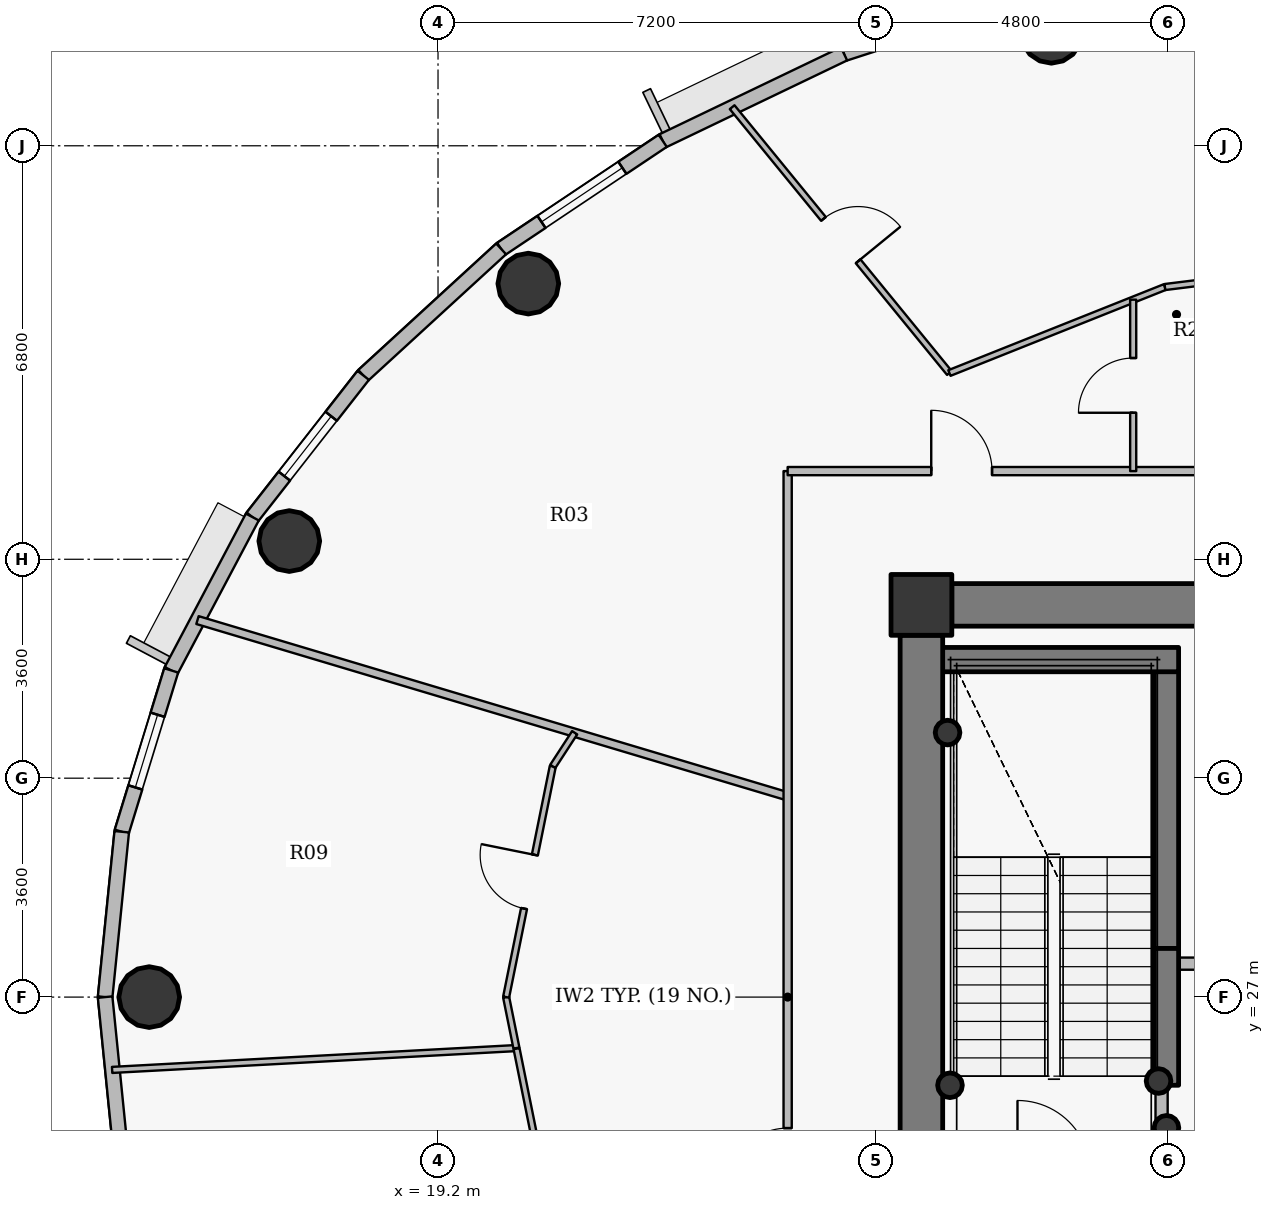
"""IFC4 building model, lengths in metres.
Left out: names, types, materials, properties, quantities, classifications, styles, units other than length and angle.
Written with IfcOpenShell. Run it as: python <this file> out.ifc"""

import sys

from ifc_helpers import new_model, si_unit, direction, frame, frame_2d, origin, origin_2d, place, context, subcontext, project, spatial, rectangle, hollow_circle, extrude, source, transform, mapped, element, fill, save


model = new_model("IFC4")
c1 = context("Model", 3, precision=1e-05, world=origin(), true_north=direction((0.0, 1.0)))
c2 = subcontext(c1, "Body", "Model", "MODEL_VIEW")
j1 = project(units=[si_unit("LENGTHUNIT", "METRE"), si_unit("PLANEANGLEUNIT", "RADIAN")], contexts=[c1])
p1 = place(None, origin())
s1 = spatial("IfcSite", under=j1, at=p1, CompositionType="ELEMENT")
p2 = place(p1, origin())
s2 = spatial("IfcBuilding", under=s1, at=p2, CompositionType="ELEMENT")
p3 = place(p2, frame((0.0, 0.0, 280.5)))
s3 = spatial("IfcBuildingStorey", under=s2, at=p3, CompositionType="ELEMENT", Elevation=280.5)
p4 = place(p3, frame((27.15, 33.45, 0.0), z_axis=(0.0, 0.0, 1.0), x_axis=(1.0, 0.0, 0.0)))
e1 = element("IfcColumn", 1, at=p4, inside=s3, PredefinedType="COLUMN", context=c2, shape_type="SweptSolid", body=[
    extrude(rectangle(XDim=1.0, YDim=1.0, at=origin_2d()), origin(), (0.0, 0.0, 1.0), 3.75),
])
p5 = place(p3, frame((31.18, 27.8, 0.0), z_axis=(0.0, 0.0, 1.0), x_axis=(0.0, 1.0, 0.0)))
e2 = element("IfcWall", 2, at=p5, inside=s3, PredefinedType="SHEAR", context=c2, shape_type="SweptSolid", body=[
    extrude(rectangle(XDim=4.75, YDim=0.4, at=frame_2d((2.375, 0.0))), origin(), (0.0, 0.0, 1.0), 3.75),
])
p6 = place(p3, frame((27.25, 32.55, 0.0), z_axis=(0.0, 0.0, 1.0), x_axis=(1.0, 0.0, 0.0)))
e3 = element("IfcWall", 3, at=p6, inside=s3, PredefinedType="SHEAR", context=c2, shape_type="SweptSolid", body=[
    extrude(rectangle(XDim=4.13, YDim=0.4, at=frame_2d((2.065, 0.0))), origin(), (0.0, 0.0, 1.0), 3.75),
])
for number, where, z_axis, x_axis in (
    (4, (27.58, 31.35, 0.0), (0.0, 0.0, 1.0), (1.0, 0.0, 0.0)),
    (5, (31.05, 25.62, 0.0), (0.0, 0.0, 1.0), (1.0, 0.0, 0.0)),
    (6, (31.18, 24.85, 0.0), (0.0, 0.0, 1.0), (1.0, 0.0, 0.0)),
    (7, (27.62, 25.55, 0.0), (0.0, 0.0, 1.0), (1.0, 0.0, 0.0)),
):
    element("IfcColumn", number, at=place(p3, frame(where, z_axis=z_axis, x_axis=x_axis)), inside=s3, PredefinedType="COLUMN", context=c2, shape_type="SweptSolid", body=[
        extrude(hollow_circle(Radius=0.203, WallThickness=0.016, at=origin_2d()), origin(), (0.0, 0.0, 1.0), 3.75),
    ])
p7 = place(p3, frame((27.65, 33.45, 0.0), z_axis=(0.0, 0.0, 1.0), x_axis=(1.0, 0.0, 0.0)))
e8 = element("IfcWall", 8, at=p7, inside=s3, PredefinedType="SHEAR", context=c2, shape_type="SweptSolid", body=[
    extrude(rectangle(XDim=16.7, YDim=0.7, at=frame_2d((8.35, 0.0))), origin(), (0.0, 0.0, 1.0), 3.05),
])
p8 = place(p7, frame((12.775, 0.0, 0.0)))
e9 = element("IfcOpeningElement", 9, at=p8, cuts=e8, PredefinedType="OPENING", context=c2, shape_type="SweptSolid", body=[
    extrude(rectangle(XDim=1.15, YDim=2.15, at=origin_2d()), frame((0.575, 0.36, 1.075), z_axis=(0.0, -1.0, 0.0), x_axis=(1.0, 0.0, 0.0)), (0.0, 0.0, 1.0), 0.72),
])
p9 = place(p3, frame((27.15, 21.05, 0.0), z_axis=(0.0, 0.0, 1.0), x_axis=(0.0, 1.0, 0.0)))
e10 = element("IfcWall", 10, at=p9, inside=s3, PredefinedType="SHEAR", context=c2, shape_type="SweptSolid", body=[
    extrude(rectangle(XDim=11.9, YDim=0.7, at=frame_2d((5.95, 0.0))), origin(), (0.0, 0.0, 1.0), 3.05),
])
p10 = place(p3, frame((31.18, 25.55, 0.0), z_axis=(0.0, 0.0, 1.0), x_axis=(0.0, 1.0, 0.0)))
e11 = element("IfcWall", 11, at=p10, inside=s3, PredefinedType="SHEAR", context=c2, shape_type="SweptSolid", body=[
    extrude(rectangle(XDim=2.25, YDim=0.4, at=frame_2d((1.125, 0.0))), origin(), (0.0, 0.0, 1.0), 3.1),
])
for number, where, z_axis, x_axis in (
    (12, (29.288, 42.858, 0.0), (0.0, 0.0, 1.0), (1.0, 0.0, 0.0)),
    (13, (20.685, 38.733, 0.0), (0.0, 0.0, 1.0), (1.0, 0.0, 0.0)),
    (14, (16.754, 34.5, 0.0), (0.0, 0.0, 1.0), (1.0, 0.0, 0.0)),
    (15, (14.45, 27.0, 0.0), (0.0, 0.0, 1.0), (1.0, 0.0, 0.0)),
):
    element("IfcColumn", number, at=place(p3, frame(where, z_axis=z_axis, x_axis=x_axis)), inside=s3, PredefinedType="COLUMN", context=c2, shape_type="SweptSolid", body=[
        extrude(hollow_circle(Radius=0.5, WallThickness=0.032, at=origin_2d()), origin(), (0.0, 0.0, 1.0), 3.75),
    ])
p11 = place(p3, frame((25.877, 42.512, 0.0), z_axis=(0.0, 0.0, 1.0), x_axis=(0.95123136723, 0.308478339592, 0.0)))
e16 = element("IfcWall", 16, at=p11, inside=s3, PredefinedType="SOLIDWALL", context=c2, shape_type="SweptSolid", body=[
    extrude(rectangle(XDim=3.398, YDim=0.24, at=frame_2d((1.699, 0.0))), origin(), (0.0, 0.0, 1.0), 3.5),
])
p12 = place(p11, frame((0.899, 0.0, 0.9)))
e17 = element("IfcOpeningElement", 17, at=p12, cuts=e16, PredefinedType="OPENING", context=c2, shape_type="SweptSolid", body=[
    extrude(rectangle(XDim=1.6, YDim=1.75, at=origin_2d()), frame((0.8, 0.13, 0.875), z_axis=(0.0, -1.0, 0.0), x_axis=(1.0, 0.0, 0.0)), (0.0, 0.0, 1.0), 0.26),
])
p13 = place(p3, frame((22.896, 41.082, 0.0), z_axis=(0.0, 0.0, 1.0), x_axis=(0.901573741254, 0.43262546051, 0.0)))
e18 = element("IfcWall", 18, at=p13, inside=s3, PredefinedType="SOLIDWALL", context=c2, shape_type="SweptSolid", body=[
    extrude(rectangle(XDim=3.307, YDim=0.24, at=frame_2d((1.653, 0.0))), origin(), (0.0, 0.0, 1.0), 3.5),
])
p14 = place(p3, frame((20.238, 39.304, 0.0), z_axis=(0.0, 0.0, 1.0), x_axis=(0.831250592635, 0.55589787933, 0.0)))
e19 = element("IfcWall", 19, at=p14, inside=s3, PredefinedType="SOLIDWALL", context=c2, shape_type="SweptSolid", body=[
    extrude(rectangle(XDim=3.197, YDim=0.24, at=frame_2d((1.599, 0.0))), origin(), (0.0, 0.0, 1.0), 3.5),
])
p15 = place(p14, frame((0.799, 0.0, 0.9)))
e20 = element("IfcOpeningElement", 20, at=p15, cuts=e19, PredefinedType="OPENING", context=c2, shape_type="SweptSolid", body=[
    extrude(rectangle(XDim=1.6, YDim=1.75, at=origin_2d()), frame((0.8, 0.13, 0.875), z_axis=(0.0, -1.0, 0.0), x_axis=(1.0, 0.0, 0.0)), (0.0, 0.0, 1.0), 0.26),
])
p16 = place(p3, frame((17.97, 37.225, 0.0), z_axis=(0.0, 0.0, 1.0), x_axis=(0.737068506972, 0.675818034703, 0.0)))
e21 = element("IfcWall", 21, at=p16, inside=s3, PredefinedType="SOLIDWALL", context=c2, shape_type="SweptSolid", body=[
    extrude(rectangle(XDim=3.077, YDim=0.24, at=frame_2d((1.539, 0.0))), origin(), (0.0, 0.0, 1.0), 3.5),
])
p17 = place(p3, frame((16.146, 34.895, 0.0), z_axis=(0.0, 0.0, 1.0), x_axis=(0.616337186556, 0.787482363275, 0.0)))
e22 = element("IfcWall", 22, at=p17, inside=s3, PredefinedType="SOLIDWALL", context=c2, shape_type="SweptSolid", body=[
    extrude(rectangle(XDim=2.958, YDim=0.24, at=frame_2d((1.479, 0.0))), origin(), (0.0, 0.0, 1.0), 3.5),
])
p18 = place(p17, frame((0.854, 0.0, 0.9)))
e23 = element("IfcOpeningElement", 23, at=p18, cuts=e22, PredefinedType="OPENING", context=c2, shape_type="SweptSolid", body=[
    extrude(rectangle(XDim=1.25, YDim=1.65, at=origin_2d()), frame((0.625, 0.13, 0.825), z_axis=(0.0, -1.0, 0.0), x_axis=(1.0, 0.0, 0.0)), (0.0, 0.0, 1.0), 0.26),
])
p19 = place(p3, frame((14.812, 32.372, 0.0), z_axis=(0.0, 0.0, 1.0), x_axis=(0.467628269026, 0.883925224218, 0.0)))
e24 = element("IfcWall", 24, at=p19, inside=s3, PredefinedType="SOLIDWALL", context=c2, shape_type="SweptSolid", body=[
    extrude(rectangle(XDim=2.854, YDim=0.24, at=frame_2d((1.427, 0.0))), origin(), (0.0, 0.0, 1.0), 3.5),
])
p20 = place(p3, frame((13.998, 29.719, 0.0), z_axis=(0.0, 0.0, 1.0), x_axis=(0.2931213403, 0.956075248012, 0.0)))
e25 = element("IfcWall", 25, at=p20, inside=s3, PredefinedType="SOLIDWALL", context=c2, shape_type="SweptSolid", body=[
    extrude(rectangle(XDim=2.775, YDim=0.24, at=frame_2d((1.388, 0.0))), origin(), (0.0, 0.0, 1.0), 3.5),
])
p21 = place(p20, frame((0.763, 0.0, 0.9)))
e26 = element("IfcOpeningElement", 26, at=p21, cuts=e25, PredefinedType="OPENING", context=c2, shape_type="SweptSolid", body=[
    extrude(rectangle(XDim=1.25, YDim=1.65, at=origin_2d()), frame((0.625, 0.13, 0.825), z_axis=(0.0, -1.0, 0.0), x_axis=(1.0, 0.0, 0.0)), (0.0, 0.0, 1.0), 0.26),
])
for number, where, z_axis, x_axis in (
    (27, (13.725, 27.0, 0.0), (0.0, 0.0, 1.0), (0.1, 0.995, 0.0)),
    (28, (13.998, 24.281, 0.0), (0.0, 0.0, 1.0), (-0.1, 0.995, 0.0)),
):
    element("IfcWall", number, at=place(p3, frame(where, z_axis=z_axis, x_axis=x_axis)), inside=s3, PredefinedType="SOLIDWALL", context=c2, shape_type="SweptSolid", body=[
        extrude(rectangle(XDim=2.733, YDim=0.24, at=frame_2d((1.366, 0.0))), origin(), (0.0, 0.0, 1.0), 3.5),
    ])
p22 = place(p3, frame((13.84, 25.802, 0.0), z_axis=(0.0, 0.0, 1.0), x_axis=(0.998542593702, 0.05396932983, 0.0)))
e29 = element("IfcWall", 29, at=p22, inside=s3, PredefinedType="PARTITIONING", context=c2, shape_type="SweptSolid", body=[
    extrude(rectangle(XDim=6.659, YDim=0.1, at=frame_2d((3.33, 0.0))), origin(), (0.0, 0.0, 1.0), 2.985),
])
p23 = place(p3, frame((15.244, 33.2, 0.0), z_axis=(0.0, 0.0, 1.0), x_axis=(0.958167234785, -0.286208927508, 0.0)))
e30 = element("IfcWall", 30, at=p23, inside=s3, PredefinedType="PARTITIONING", context=c2, shape_type="SweptSolid", body=[
    extrude(rectangle(XDim=10.13, YDim=0.135, at=frame_2d((5.065, 0.0))), origin(), (0.0, 0.0, 1.0), 2.985),
])
p24 = place(p3, frame((20.32, 27.0, 0.0), z_axis=(0.0, 0.0, 1.0), x_axis=(0.198147261764, -0.980172261725, 0.0)))
e31 = element("IfcWall", 31, at=p24, inside=s3, PredefinedType="PARTITIONING", context=c2, shape_type="SweptSolid", body=[
    extrude(rectangle(XDim=0.855, YDim=0.1, at=frame_2d((0.427, 0.0))), origin(), (0.0, 0.0, 1.0), 3.035),
])
p25 = place(p3, frame((20.32, 27.0, 0.0), z_axis=(0.0, 0.0, 1.0), x_axis=(0.198226068862, 0.980156327135, 0.0)))
e32 = element("IfcWall", 32, at=p25, inside=s3, PredefinedType="PARTITIONING", context=c2, shape_type="SweptSolid", body=[
    extrude(rectangle(XDim=3.871, YDim=0.1, at=frame_2d((1.936, 0.0))), origin(), (0.0, 0.0, 1.0), 3.035),
])
p26 = place(p25, frame((1.486, 0.0, 0.0)))
e33 = element("IfcOpeningElement", 33, at=p26, cuts=e32, PredefinedType="OPENING", context=c2, shape_type="SweptSolid", body=[
    extrude(rectangle(XDim=0.9, YDim=2.1, at=origin_2d()), frame((0.45, 0.06, 1.05), z_axis=(0.0, -1.0, 0.0), x_axis=(1.0, 0.0, 0.0)), (0.0, 0.0, 1.0), 0.12),
])
p27 = place(p3, frame((20.491, 26.152, 0.0), z_axis=(0.0, 0.0, 1.0), x_axis=(0.198255475343, -0.980150379532, 0.0)))
e34 = element("IfcWall", 34, at=p27, inside=s3, PredefinedType="PARTITIONING", context=c2, shape_type="SweptSolid", body=[
    extrude(rectangle(XDim=3.006, YDim=0.1, at=frame_2d((1.503, 0.0))), origin(), (0.0, 0.0, 1.0), 3.035),
])
p28 = place(p3, frame((21.087, 30.794, 0.0), z_axis=(0.0, 0.0, 1.0), x_axis=(0.545443507803, 0.838147588313, 0.0)))
e35 = element("IfcWall", 35, at=p28, inside=s3, PredefinedType="PARTITIONING", context=c2, shape_type="SweptSolid", body=[
    extrude(rectangle(XDim=0.66, YDim=0.1, at=frame_2d((0.33, 0.0))), origin(), (0.0, 0.0, 1.0), 3.5),
])
p29 = place(p3, frame((24.037, 41.635, 0.0), z_axis=(0.0, 0.0, 1.0), x_axis=(0.632896331295, -0.774236549017, 0.0)))
e36 = element("IfcWall", 36, at=p29, inside=s3, PredefinedType="PARTITIONING", context=c2, shape_type="SweptSolid", body=[
    extrude(rectangle(XDim=5.647, YDim=0.1, at=frame_2d((2.823, 0.0))), origin(), (0.0, 0.0, 1.0), 2.985),
])
p30 = place(p29, frame((2.373, 0.0, 0.0)))
e37 = element("IfcOpeningElement", 37, at=p30, cuts=e36, PredefinedType="OPENING", context=c2, shape_type="SweptSolid", body=[
    extrude(rectangle(XDim=0.9, YDim=2.1, at=origin_2d()), frame((0.45, 0.06, 1.05), z_axis=(0.0, -1.0, 0.0), x_axis=(1.0, 0.0, 0.0)), (0.0, 0.0, 1.0), 0.12),
])
p31 = place(p3, frame((24.95, 18.35, 0.0), z_axis=(0.0, 0.0, 1.0), x_axis=(0.0, 1.0, 0.0)))
e38 = element("IfcWall", 38, at=p31, inside=s3, PredefinedType="PARTITIONING", context=c2, shape_type="SweptSolid", body=[
    extrude(rectangle(XDim=17.3, YDim=0.135, at=frame_2d((8.65, 0.0))), origin(), (0.0, 0.0, 1.0), 3.035),
])
p32 = place(p31, frame((5.495, 0.0, 0.0)))
e39 = element("IfcOpeningElement", 39, at=p32, cuts=e38, PredefinedType="OPENING", context=c2, shape_type="SweptSolid", body=[
    extrude(rectangle(XDim=1.0, YDim=2.15, at=origin_2d()), frame((0.5, 0.078, 1.075), z_axis=(0.0, -1.0, 0.0), x_axis=(1.0, 0.0, 0.0)), (0.0, 0.0, 1.0), 0.155),
])
p33 = place(p3, frame((24.95, 35.65, 0.0), z_axis=(0.0, 0.0, 1.0), x_axis=(1.0, 0.0, 0.0)))
e40 = element("IfcWall", 40, at=p33, inside=s3, PredefinedType="PARTITIONING", context=c2, shape_type="SweptSolid", body=[
    extrude(rectangle(XDim=10.1, YDim=0.135, at=frame_2d((5.05, 0.0))), origin(), (0.0, 0.0, 1.0), 3.035),
])
p34 = place(p33, frame((2.362, 0.0, 0.0)))
e41 = element("IfcOpeningElement", 41, at=p34, cuts=e40, PredefinedType="OPENING", context=c2, shape_type="SweptSolid", body=[
    extrude(rectangle(XDim=1.0, YDim=2.15, at=origin_2d()), frame((0.5, 0.078, 1.075), z_axis=(0.0, -1.0, 0.0), x_axis=(1.0, 0.0, 0.0)), (0.0, 0.0, 1.0), 0.155),
])
p35 = place(p3, frame((27.611, 37.263, 0.0), z_axis=(0.0, 0.0, 1.0), x_axis=(0.92879851462, 0.370585103911, 0.0)))
e42 = element("IfcWall", 42, at=p35, inside=s3, PredefinedType="PARTITIONING", context=c2, shape_type="SweptSolid", body=[
    extrude(rectangle(XDim=3.815, YDim=0.1, at=frame_2d((1.908, 0.0))), origin(), (0.0, 0.0, 1.0), 3.035),
])
p36 = place(p3, frame((30.633, 35.65, 0.0), z_axis=(0.0, 0.0, 1.0), x_axis=(0.0, 1.0, 0.0)))
e43 = element("IfcWall", 43, at=p36, inside=s3, PredefinedType="PARTITIONING", context=c2, shape_type="SweptSolid", body=[
    extrude(rectangle(XDim=2.819, YDim=0.1, at=frame_2d((1.41, 0.0))), origin(), (0.0, 0.0, 1.0), 3.5),
])
p37 = place(p36, frame((0.959, 0.0, 0.0)))
e44 = element("IfcOpeningElement", 44, at=p37, cuts=e43, PredefinedType="OPENING", context=c2, shape_type="SweptSolid", body=[
    extrude(rectangle(XDim=0.9, YDim=2.1, at=origin_2d()), frame((0.45, 0.06, 1.05), z_axis=(0.0, -1.0, 0.0), x_axis=(1.0, 0.0, 0.0)), (0.0, 0.0, 1.0), 0.12),
])
p38 = place(p3, frame((31.1, 24.1, 0.0), z_axis=(0.0, 0.0, 1.0), x_axis=(0.0, 1.0, 0.0)))
e45 = element("IfcWall", 45, at=p38, inside=s3, PredefinedType="PARTITIONING", context=c2, shape_type="SweptSolid", body=[
    extrude(rectangle(XDim=1.44, YDim=0.2, at=frame_2d((0.72, 0.0))), origin(), (0.0, 0.0, 1.0), 3.5),
])
p39 = place(p3, frame((31.1, 27.55, 0.0), z_axis=(0.0, 0.0, 1.0), x_axis=(1.0, 0.0, 0.0)))
e46 = element("IfcWall", 46, at=p39, inside=s3, PredefinedType="PARTITIONING", context=c2, shape_type="SweptSolid", body=[
    extrude(rectangle(XDim=2.8, YDim=0.2, at=frame_2d((1.4, 0.0))), origin(), (0.0, 0.0, 1.0), 3.085),
])
p40 = place(p39, frame((1.5, 0.0, 0.0)))
e47 = element("IfcOpeningElement", 47, at=p40, cuts=e46, PredefinedType="OPENING", context=c2, shape_type="SweptSolid", body=[
    extrude(rectangle(XDim=0.66, YDim=2.05, at=origin_2d()), frame((0.33, 0.11, 1.025), z_axis=(0.0, -1.0, 0.0), x_axis=(1.0, 0.0, 0.0)), (0.0, 0.0, 1.0), 0.22),
])
p41 = place(p3, frame((31.155, 38.677, 0.0), z_axis=(0.0, 0.0, 1.0), x_axis=(0.99239360053, 0.123105408601, 0.0)))
e48 = element("IfcWall", 48, at=p41, inside=s3, PredefinedType="PARTITIONING", context=c2, shape_type="SweptSolid", body=[
    extrude(rectangle(XDim=4.883, YDim=0.1, at=frame_2d((2.441, 0.0))), origin(), (0.0, 0.0, 1.0), 3.035),
])
p42 = place(p3, frame((27.64, 33.8, 0.0), z_axis=(0.0, 0.0, 1.0), x_axis=(-1.0, 0.0, 0.0)))
e49 = element("IfcWall", 49, at=p42, inside=s3, PredefinedType="PARTITIONING", context=c2, shape_type="SweptSolid", body=[
    extrude(rectangle(XDim=0.84, YDim=0.135, at=frame_2d((0.42, 0.0))), origin(), (0.0, 0.0, 1.0), 3.035),
])
p43 = place(p3, frame((26.8, 33.492, 0.0), z_axis=(0.0, 0.0, 1.0), x_axis=(0.0, -1.0, 0.0)))
e50 = element("IfcWall", 50, at=p43, inside=s3, PredefinedType="PARTITIONING", context=c2, shape_type="SweptSolid", body=[
    extrude(rectangle(XDim=0.532, YDim=0.135, at=frame_2d((0.266, 0.0))), origin(), (0.0, 0.0, 1.0), 3.5),
])
m1 = source(origin(), c2, "Body", "SweptSolid", [
    extrude(rectangle(XDim=1.6, YDim=1.75, at=origin_2d()), frame((0.8, 0.03, 0.875), z_axis=(0.0, -1.0, 0.0), x_axis=(1.0, 0.0, 0.0)), (0.0, 0.0, 1.0), 0.06),
])
p44 = place(p15, origin())
e51 = element("IfcWindow", 51, at=p44, inside=s3, PartitioningType="DOUBLE_PANEL_VERTICAL", PredefinedType="WINDOW", context=c2, shape_type="MappedRepresentation", body=[
    mapped(m1, transform((0.0, 0.0, 0.0), x_axis=(1.0, 0.0, 0.0), y_axis=(0.0, 1.0, 0.0), z_axis=(0.0, 0.0, 1.0), scale=1.0)),
])
fill(e20, e51)
m2 = source(origin(), c2, "Body", "SweptSolid", [
    extrude(rectangle(XDim=1.25, YDim=1.65, at=origin_2d()), frame((0.625, 0.03, 0.825), z_axis=(0.0, -1.0, 0.0), x_axis=(1.0, 0.0, 0.0)), (0.0, 0.0, 1.0), 0.06),
])
p45 = place(p18, origin())
e52 = element("IfcWindow", 52, at=p45, inside=s3, PartitioningType="SINGLE_PANEL", PredefinedType="WINDOW", context=c2, shape_type="MappedRepresentation", body=[
    mapped(m2, transform((0.0, 0.0, 0.0), x_axis=(1.0, 0.0, 0.0), y_axis=(0.0, 1.0, 0.0), z_axis=(0.0, 0.0, 1.0), scale=1.0)),
])
fill(e23, e52)
p46 = place(p21, origin())
e53 = element("IfcWindow", 53, at=p46, inside=s3, PartitioningType="SINGLE_PANEL", PredefinedType="WINDOW", context=c2, shape_type="MappedRepresentation", body=[
    mapped(m2, transform((0.0, 0.0, 0.0), x_axis=(1.0, 0.0, 0.0), y_axis=(0.0, 1.0, 0.0), z_axis=(0.0, 0.0, 1.0), scale=1.0)),
])
fill(e26, e53)
m3 = source(origin(), c2, "Body", "SweptSolid", [
    extrude(rectangle(XDim=1.0, YDim=2.15, at=origin_2d()), frame((0.5, 0.025, 1.075), z_axis=(0.0, -1.0, 0.0), x_axis=(1.0, 0.0, 0.0)), (0.0, 0.0, 1.0), 0.05),
])
p47 = place(p34, origin())
e54 = element("IfcDoor", 54, at=p47, inside=s3, OperationType="SINGLE_SWING_LEFT", PredefinedType="DOOR", context=c2, shape_type="MappedRepresentation", body=[
    mapped(m3, transform((0.0, 0.0, 0.0), x_axis=(1.0, 0.0, 0.0), y_axis=(0.0, 1.0, 0.0), z_axis=(0.0, 0.0, 1.0), scale=1.0)),
])
fill(e41, e54)
m4 = source(origin(), c2, "Body", "SweptSolid", [
    extrude(rectangle(XDim=0.9, YDim=2.1, at=origin_2d()), frame((0.45, 0.025, 1.05), z_axis=(0.0, -1.0, 0.0), x_axis=(1.0, 0.0, 0.0)), (0.0, 0.0, 1.0), 0.05),
])
p48 = place(p30, origin())
e55 = element("IfcDoor", 55, at=p48, inside=s3, OperationType="SINGLE_SWING_RIGHT", PredefinedType="DOOR", context=c2, shape_type="MappedRepresentation", body=[
    mapped(m4, transform((0.0, 0.0, 0.0), x_axis=(1.0, 0.0, 0.0), y_axis=(0.0, 1.0, 0.0), z_axis=(0.0, 0.0, 1.0), scale=1.0)),
])
fill(e37, e55)
p49 = place(p37, origin())
e56 = element("IfcDoor", 56, at=p49, inside=s3, OperationType="SINGLE_SWING_LEFT", PredefinedType="DOOR", context=c2, shape_type="MappedRepresentation", body=[
    mapped(m4, transform((0.0, 0.0, 0.0), x_axis=(1.0, 0.0, 0.0), y_axis=(0.0, 1.0, 0.0), z_axis=(0.0, 0.0, 1.0), scale=1.0)),
])
fill(e44, e56)
p50 = place(p32, origin())
e57 = element("IfcDoor", 57, at=p50, inside=s3, OperationType="SINGLE_SWING_LEFT", PredefinedType="DOOR", context=c2, shape_type="MappedRepresentation", body=[
    mapped(m3, transform((0.0, 0.0, 0.0), x_axis=(1.0, 0.0, 0.0), y_axis=(0.0, 1.0, 0.0), z_axis=(0.0, 0.0, 1.0), scale=1.0)),
])
fill(e39, e57)
p51 = place(p26, origin())
e58 = element("IfcDoor", 58, at=p51, inside=s3, OperationType="SINGLE_SWING_RIGHT", PredefinedType="DOOR", context=c2, shape_type="MappedRepresentation", body=[
    mapped(m4, transform((0.0, 0.0, 0.0), x_axis=(1.0, 0.0, 0.0), y_axis=(0.0, 1.0, 0.0), z_axis=(0.0, 0.0, 1.0), scale=1.0)),
])
fill(e33, e58)
save(model, sys.argv[1])
